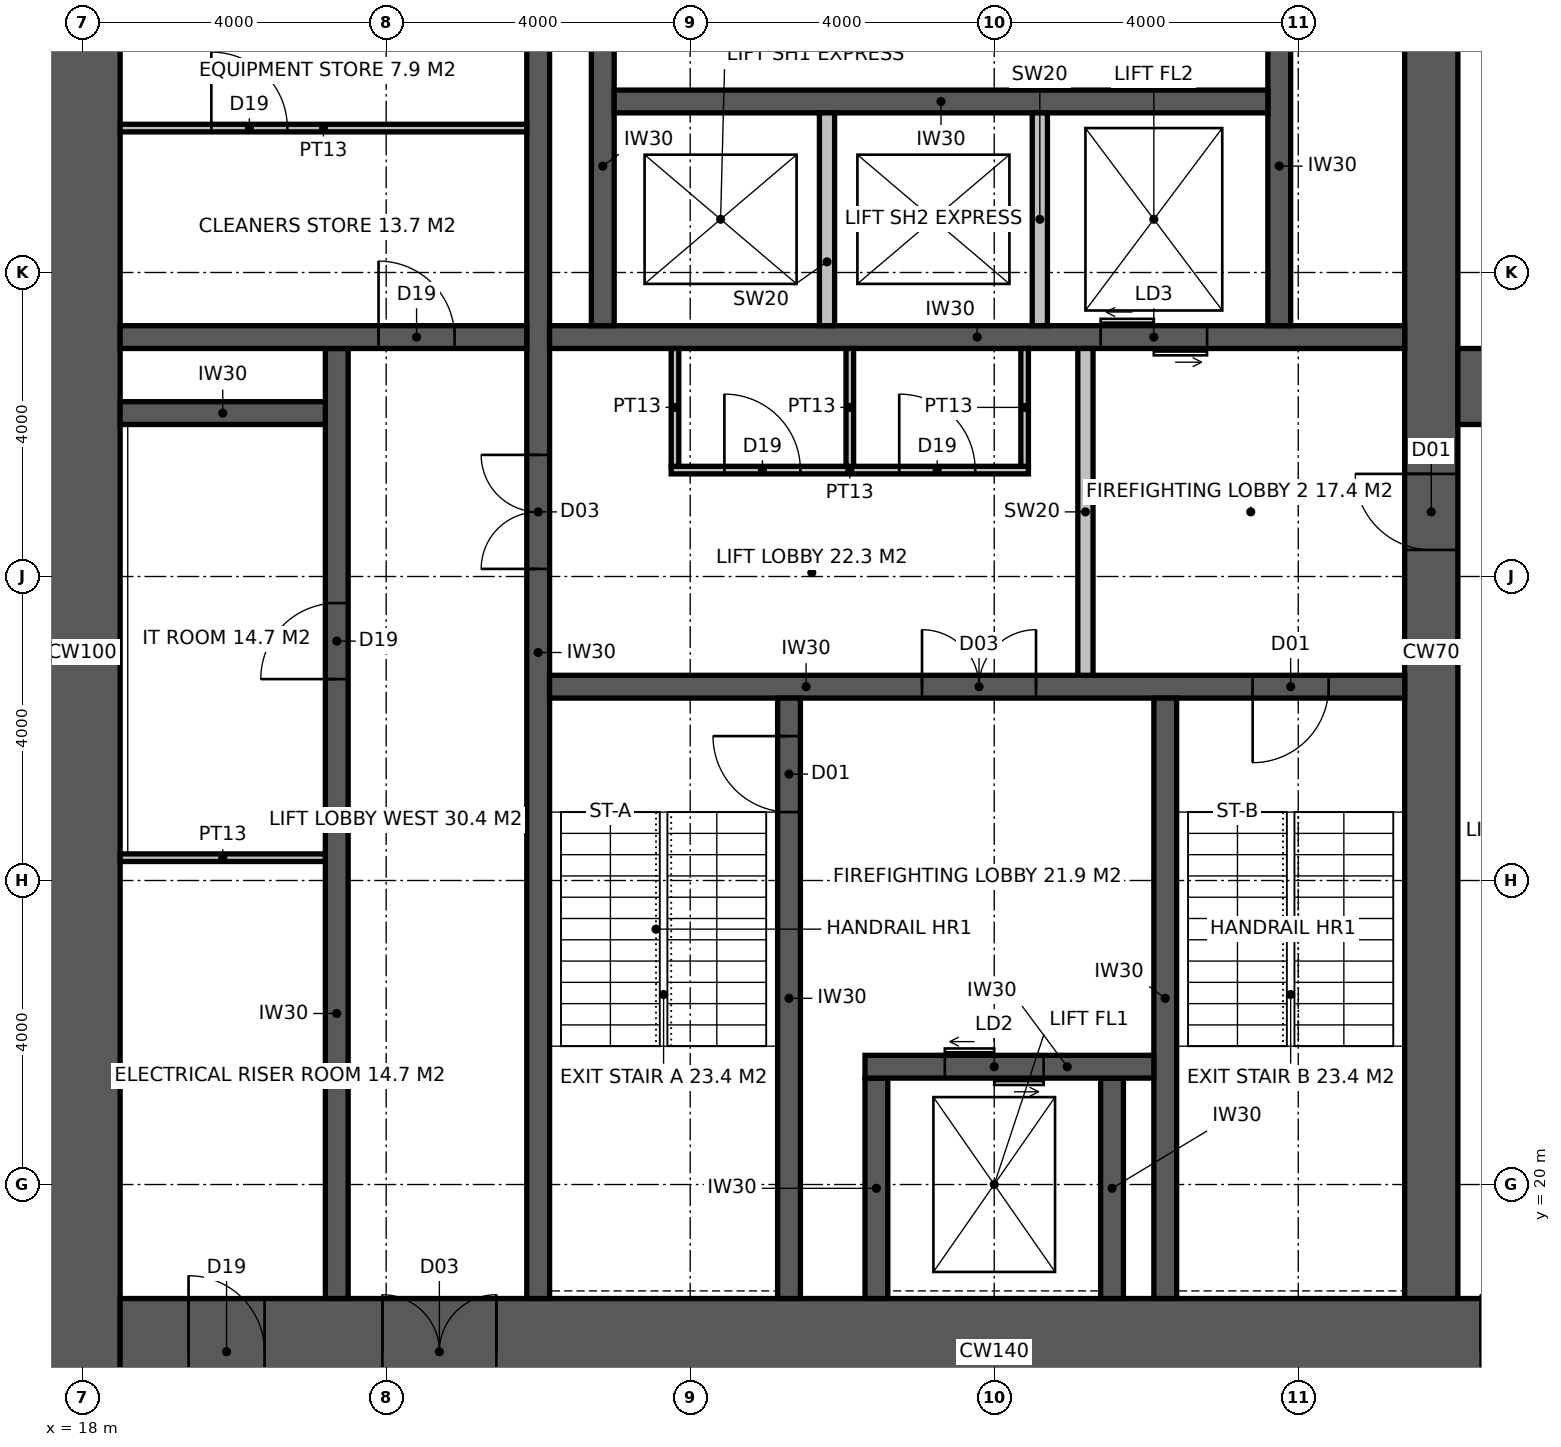
"""IFC4 building model, lengths in metres.
Left out: names, types, materials, properties, quantities, classifications, styles, units other than length and angle.
Written with IfcOpenShell. Run it as: python <this file> out.ifc"""

import sys

from ifc_helpers import new_model, si_unit, direction, frame, frame_2d, origin, place, context, subcontext, project, spatial, rectangle, extrude, element, fill, save


model = new_model("IFC4")
c1 = context("Model", 3, precision=1e-05, world=origin(), true_north=direction((0.0, 1.0)))
c2 = subcontext(c1, "Body", "Model", "MODEL_VIEW")
j1 = project(units=[si_unit("LENGTHUNIT", "METRE"), si_unit("PLANEANGLEUNIT", "RADIAN")], contexts=[c1])
p1 = place(None, origin())
s1 = spatial("IfcSite", under=j1, at=p1, CompositionType="ELEMENT")
p2 = place(p1, origin())
s2 = spatial("IfcBuilding", under=s1, at=p2, CompositionType="ELEMENT")
p3 = place(p2, frame((0.0, 0.0, 27.0)))
s3 = spatial("IfcBuildingStorey", under=s2, at=p3, CompositionType="ELEMENT", Elevation=27.0)
p4 = place(p3, frame((18.0, 17.1, -0.15), z_axis=(0.0, 0.0, 1.0), x_axis=(0.0, 1.0, 0.0)))
e1 = element("IfcWall", 1, at=p4, inside=s3, PredefinedType="SHEAR", context=c2, shape_type="SweptSolid", body=[
    extrude(rectangle(XDim=19.8, YDim=1.0, at=frame_2d((9.9, 0.0))), origin(), (0.0, 0.0, 1.0), 4.0),
])
p5 = place(p3, frame((18.5, 17.8, -0.15), z_axis=(0.0, 0.0, 1.0), x_axis=(1.0, 0.0, 0.0)))
e2 = element("IfcWall", 2, at=p5, inside=s3, PredefinedType="SHEAR", context=c2, shape_type="SweptSolid", body=[
    extrude(rectangle(XDim=23.0, YDim=1.4, at=frame_2d((11.5, 0.0))), origin(), (0.0, 0.0, 1.0), 4.0),
])
p6 = place(p5, frame((3.45, 0.0, 0.15)))
e3 = element("IfcOpeningElement", 3, at=p6, cuts=e2, PredefinedType="OPENING", context=c2, shape_type="SweptSolid", body=[
    extrude(rectangle(XDim=1.5, YDim=2.4, at=frame_2d((0.75, 1.2))), frame((0.0, 0.71, 0.0), z_axis=(0.0, -1.0, 0.0), x_axis=(1.0, 0.0, 0.0)), (0.0, 0.0, 1.0), 1.42),
])
p7 = place(p5, frame((17.9, 0.0, 0.15)))
e4 = element("IfcOpeningElement", 4, at=p7, cuts=e2, PredefinedType="OPENING", context=c2, shape_type="SweptSolid", body=[
    extrude(rectangle(XDim=1.5, YDim=2.4, at=frame_2d((0.75, 1.2))), frame((0.0, 0.71, 0.0), z_axis=(0.0, -1.0, 0.0), x_axis=(1.0, 0.0, 0.0)), (0.0, 0.0, 1.0), 1.42),
])
p8 = place(p5, frame((0.9, 0.0, 0.15)))
e5 = element("IfcOpeningElement", 5, at=p8, cuts=e2, PredefinedType="OPENING", context=c2, shape_type="SweptSolid", body=[
    extrude(rectangle(XDim=1.0, YDim=2.2, at=frame_2d((0.5, 1.1))), frame((0.0, 0.71, 0.0), z_axis=(0.0, -1.0, 0.0), x_axis=(1.0, 0.0, 0.0)), (0.0, 0.0, 1.0), 1.42),
])
p9 = place(p3, frame((35.75, 18.5, -0.15), z_axis=(0.0, 0.0, 1.0), x_axis=(0.0, 1.0, 0.0)))
e6 = element("IfcWall", 6, at=p9, inside=s3, PredefinedType="SHEAR", context=c2, shape_type="SweptSolid", body=[
    extrude(rectangle(XDim=17.0, YDim=0.7, at=frame_2d((8.5, 0.0))), origin(), (0.0, 0.0, 1.0), 4.0),
])
p10 = place(p9, frame((9.85, 0.0, 0.15)))
e7 = element("IfcOpeningElement", 7, at=p10, cuts=e6, PredefinedType="OPENING", context=c2, shape_type="SweptSolid", body=[
    extrude(rectangle(XDim=1.0, YDim=2.2, at=frame_2d((0.5, 1.1))), frame((0.0, 0.36, 0.0), z_axis=(0.0, -1.0, 0.0), x_axis=(1.0, 0.0, 0.0)), (0.0, 0.0, 1.0), 0.72),
])
p11 = place(p3, frame((24.0, 18.5, -0.15), z_axis=(0.0, 0.0, 1.0), x_axis=(0.0, 1.0, 0.0)))
e8 = element("IfcWall", 8, at=p11, inside=s3, PredefinedType="SHEAR", context=c2, shape_type="SweptSolid", body=[
    extrude(rectangle(XDim=17.0, YDim=0.3, at=frame_2d((8.5, 0.0))), origin(), (0.0, 0.0, 1.0), 4.0),
])
p12 = place(p11, frame((9.6, 0.0, 0.15)))
e9 = element("IfcOpeningElement", 9, at=p12, cuts=e8, PredefinedType="OPENING", context=c2, shape_type="SweptSolid", body=[
    extrude(rectangle(XDim=1.5, YDim=2.4, at=frame_2d((0.75, 1.2))), frame((0.0, 0.16, 0.0), z_axis=(0.0, -1.0, 0.0), x_axis=(1.0, 0.0, 0.0)), (0.0, 0.0, 1.0), 0.32),
])
p13 = place(p3, frame((24.15, 26.55, -0.15), z_axis=(0.0, 0.0, 1.0), x_axis=(1.0, 0.0, 0.0)))
e10 = element("IfcWall", 10, at=p13, inside=s3, PredefinedType="SHEAR", context=c2, shape_type="SweptSolid", body=[
    extrude(rectangle(XDim=11.25, YDim=0.3, at=frame_2d((5.625, 0.0))), origin(), (0.0, 0.0, 1.0), 4.0),
])
p14 = place(p13, frame((9.25, 0.0, 0.15)))
e11 = element("IfcOpeningElement", 11, at=p14, cuts=e10, PredefinedType="OPENING", context=c2, shape_type="SweptSolid", body=[
    extrude(rectangle(XDim=1.0, YDim=2.2, at=frame_2d((0.5, 1.1))), frame((0.0, 0.16, 0.0), z_axis=(0.0, -1.0, 0.0), x_axis=(1.0, 0.0, 0.0)), (0.0, 0.0, 1.0), 0.32),
])
p15 = place(p13, frame((4.9, 0.0, 0.15)))
e12 = element("IfcOpeningElement", 12, at=p15, cuts=e10, PredefinedType="OPENING", context=c2, shape_type="SweptSolid", body=[
    extrude(rectangle(XDim=1.5, YDim=2.4, at=frame_2d((0.75, 1.2))), frame((0.0, 0.16, 0.0), z_axis=(0.0, -1.0, 0.0), x_axis=(1.0, 0.0, 0.0)), (0.0, 0.0, 1.0), 0.32),
])
p16 = place(p3, frame((27.3, 18.5, -0.15), z_axis=(0.0, 0.0, 1.0), x_axis=(0.0, 1.0, 0.0)))
e13 = element("IfcWall", 13, at=p16, inside=s3, PredefinedType="SHEAR", context=c2, shape_type="SweptSolid", body=[
    extrude(rectangle(XDim=7.9, YDim=0.3, at=frame_2d((3.95, 0.0))), origin(), (0.0, 0.0, 1.0), 4.0),
])
p17 = place(p16, frame((6.4, 0.0, 0.15)))
e14 = element("IfcOpeningElement", 14, at=p17, cuts=e13, PredefinedType="OPENING", context=c2, shape_type="SweptSolid", body=[
    extrude(rectangle(XDim=1.0, YDim=2.2, at=frame_2d((0.5, 1.1))), frame((0.0, 0.16, 0.0), z_axis=(0.0, -1.0, 0.0), x_axis=(1.0, 0.0, 0.0)), (0.0, 0.0, 1.0), 0.32),
])
p18 = place(p3, frame((32.25, 18.5, -0.15), z_axis=(0.0, 0.0, 1.0), x_axis=(0.0, 1.0, 0.0)))
e15 = element("IfcWall", 15, at=p18, inside=s3, PredefinedType="SHEAR", context=c2, shape_type="SweptSolid", body=[
    extrude(rectangle(XDim=7.9, YDim=0.3, at=frame_2d((3.95, 0.0))), origin(), (0.0, 0.0, 1.0), 4.0),
])
for number, where, z_axis, x_axis in (
    (16, (28.45, 18.5, -0.15), (0.0, 0.0, 1.0), (0.0, 1.0, 0.0)),
    (17, (31.55, 18.5, -0.15), (0.0, 0.0, 1.0), (0.0, 1.0, 0.0)),
):
    element("IfcWall", number, at=place(p3, frame(where, z_axis=z_axis, x_axis=x_axis)), inside=s3, PredefinedType="SHEAR", context=c2, shape_type="SweptSolid", body=[
        extrude(rectangle(XDim=2.9, YDim=0.3, at=frame_2d((1.45, 0.0))), origin(), (0.0, 0.0, 1.0), 4.0),
    ])
p19 = place(p3, frame((28.3, 21.55, -0.15), z_axis=(0.0, 0.0, 1.0), x_axis=(1.0, 0.0, 0.0)))
e18 = element("IfcWall", 18, at=p19, inside=s3, PredefinedType="SHEAR", context=c2, shape_type="SweptSolid", body=[
    extrude(rectangle(XDim=3.8, YDim=0.3, at=frame_2d((1.9, 0.0))), origin(), (0.0, 0.0, 1.0), 4.0),
])
p20 = place(p19, frame((1.05, 0.0, 0.15)))
e19 = element("IfcOpeningElement", 19, at=p20, cuts=e18, PredefinedType="OPENING", context=c2, shape_type="SweptSolid", body=[
    extrude(rectangle(XDim=1.3, YDim=2.4, at=frame_2d((0.65, 1.2))), frame((0.0, 0.16, 0.0), z_axis=(0.0, -1.0, 0.0), x_axis=(1.0, 0.0, 0.0)), (0.0, 0.0, 1.0), 0.32),
])
p21 = place(p3, frame((24.15, 31.15, -0.15), z_axis=(0.0, 0.0, 1.0), x_axis=(1.0, 0.0, 0.0)))
e20 = element("IfcWall", 20, at=p21, inside=s3, PredefinedType="SHEAR", context=c2, shape_type="SweptSolid", body=[
    extrude(rectangle(XDim=11.25, YDim=0.3, at=frame_2d((5.625, 0.0))), origin(), (0.0, 0.0, 1.0), 4.0),
])
p22 = place(p21, frame((7.25, 0.0, 0.15)))
e21 = element("IfcOpeningElement", 21, at=p22, cuts=e20, PredefinedType="OPENING", context=c2, shape_type="SweptSolid", body=[
    extrude(rectangle(XDim=1.4, YDim=2.4, at=frame_2d((0.7, 1.2))), frame((0.0, 0.16, 0.0), z_axis=(0.0, -1.0, 0.0), x_axis=(1.0, 0.0, 0.0)), (0.0, 0.0, 1.0), 0.32),
])
p23 = place(p3, frame((21.35, 18.5, -0.15), z_axis=(0.0, 0.0, 1.0), x_axis=(0.0, 1.0, 0.0)))
e22 = element("IfcWall", 22, at=p23, inside=s3, PredefinedType="SHEAR", context=c2, shape_type="SweptSolid", body=[
    extrude(rectangle(XDim=12.5, YDim=0.3, at=frame_2d((6.25, 0.0))), origin(), (0.0, 0.0, 1.0), 4.0),
])
p24 = place(p23, frame((8.15, 0.0, 0.15)))
e23 = element("IfcOpeningElement", 23, at=p24, cuts=e22, PredefinedType="OPENING", context=c2, shape_type="SweptSolid", body=[
    extrude(rectangle(XDim=1.0, YDim=2.2, at=frame_2d((0.5, 1.1))), frame((0.0, 0.16, 0.0), z_axis=(0.0, -1.0, 0.0), x_axis=(1.0, 0.0, 0.0)), (0.0, 0.0, 1.0), 0.32),
])
p25 = place(p3, frame((18.5, 31.15, -0.15), z_axis=(0.0, 0.0, 1.0), x_axis=(1.0, 0.0, 0.0)))
e24 = element("IfcWall", 24, at=p25, inside=s3, PredefinedType="SHEAR", context=c2, shape_type="SweptSolid", body=[
    extrude(rectangle(XDim=5.35, YDim=0.3, at=frame_2d((2.675, 0.0))), origin(), (0.0, 0.0, 1.0), 4.0),
])
p26 = place(p25, frame((3.4, 0.0, 0.15)))
e25 = element("IfcOpeningElement", 25, at=p26, cuts=e24, PredefinedType="OPENING", context=c2, shape_type="SweptSolid", body=[
    extrude(rectangle(XDim=1.0, YDim=2.2, at=frame_2d((0.5, 1.1))), frame((0.0, 0.16, 0.0), z_axis=(0.0, -1.0, 0.0), x_axis=(1.0, 0.0, 0.0)), (0.0, 0.0, 1.0), 0.32),
])
p27 = place(p3, frame((18.5, 30.15, -0.15), z_axis=(0.0, 0.0, 1.0), x_axis=(1.0, 0.0, 0.0)))
e26 = element("IfcWall", 26, at=p27, inside=s3, PredefinedType="SHEAR", context=c2, shape_type="SweptSolid", body=[
    extrude(rectangle(XDim=2.7, YDim=0.3, at=frame_2d((1.35, 0.0))), origin(), (0.0, 0.0, 1.0), 4.0),
])
for number, where, z_axis, x_axis in (
    (27, (24.85, 31.3, -0.15), (0.0, 0.0, 1.0), (0.0, 1.0, 0.0)),
    (28, (33.75, 31.3, -0.15), (0.0, 0.0, 1.0), (0.0, 1.0, 0.0)),
):
    element("IfcWall", number, at=place(p3, frame(where, z_axis=z_axis, x_axis=x_axis)), inside=s3, PredefinedType="SHEAR", context=c2, shape_type="SweptSolid", body=[
        extrude(rectangle(XDim=4.2, YDim=0.3, at=frame_2d((2.1, 0.0))), origin(), (0.0, 0.0, 1.0), 4.0),
    ])
p28 = place(p3, frame((25.0, 34.25, -0.15), z_axis=(0.0, 0.0, 1.0), x_axis=(1.0, 0.0, 0.0)))
e29 = element("IfcWall", 29, at=p28, inside=s3, PredefinedType="SHEAR", context=c2, shape_type="SweptSolid", body=[
    extrude(rectangle(XDim=8.6, YDim=0.3, at=frame_2d((4.3, 0.0))), origin(), (0.0, 0.0, 1.0), 4.0),
])
for number, where, z_axis, x_axis in (
    (30, (27.8, 31.3, -0.15), (0.0, 0.0, 1.0), (0.0, 1.0, 0.0)),
    (31, (30.6, 31.3, -0.15), (0.0, 0.0, 1.0), (0.0, 1.0, 0.0)),
):
    element("IfcWall", number, at=place(p3, frame(where, z_axis=z_axis, x_axis=x_axis)), inside=s3, PredefinedType="SOLIDWALL", context=c2, shape_type="SweptSolid", body=[
        extrude(rectangle(XDim=2.8, YDim=0.2, at=frame_2d((1.4, 0.0))), origin(), (0.0, 0.0, 1.0), 4.0),
    ])
p29 = place(p3, frame((36.1, 30.5, -0.15), z_axis=(0.0, 0.0, 1.0), x_axis=(1.0, 0.0, 0.0)))
e32 = element("IfcWall", 32, at=p29, inside=s3, PredefinedType="SHEAR", context=c2, shape_type="SweptSolid", body=[
    extrude(rectangle(XDim=5.4, YDim=1.0, at=frame_2d((2.7, 0.0))), origin(), (0.0, 0.0, 1.0), 4.0),
])
p30 = place(p29, frame((0.6, 0.0, 0.15)))
e33 = element("IfcOpeningElement", 33, at=p30, cuts=e32, PredefinedType="OPENING", context=c2, shape_type="SweptSolid", body=[
    extrude(rectangle(XDim=1.0, YDim=2.2, at=frame_2d((0.5, 1.1))), frame((0.0, 0.51, 0.0), z_axis=(0.0, -1.0, 0.0), x_axis=(1.0, 0.0, 0.0)), (0.0, 0.0, 1.0), 1.02),
])
p31 = place(p3, frame((31.2, 26.7, 0.0), z_axis=(0.0, 0.0, 1.0), x_axis=(0.0, 1.0, 0.0)))
e34 = element("IfcWall", 34, at=p31, inside=s3, PredefinedType="SOLIDWALL", context=c2, shape_type="SweptSolid", body=[
    extrude(rectangle(XDim=4.3, YDim=0.2, at=frame_2d((2.15, 0.0))), origin(), (0.0, 0.0, 1.0), 3.85),
])
p32 = place(p3, frame((18.5, 33.9, 0.0), z_axis=(0.0, 0.0, 1.0), x_axis=(1.0, 0.0, 0.0)))
e35 = element("IfcWall", 35, at=p32, inside=s3, PredefinedType="PARTITIONING", context=c2, shape_type="SweptSolid", body=[
    extrude(rectangle(XDim=5.35, YDim=0.1, at=frame_2d((2.675, 0.0))), origin(), (0.0, 0.0, 1.0), 3.85),
])
p33 = place(p32, frame((1.2, 0.0, 0.0)))
e36 = element("IfcOpeningElement", 36, at=p33, cuts=e35, PredefinedType="OPENING", context=c2, shape_type="SweptSolid", body=[
    extrude(rectangle(XDim=1.0, YDim=2.2, at=frame_2d((0.5, 1.1))), frame((0.0, 0.06, 0.0), z_axis=(0.0, -1.0, 0.0), x_axis=(1.0, 0.0, 0.0)), (0.0, 0.0, 1.0), 0.12),
])
p34 = place(p3, frame((25.75, 29.4, 0.0), z_axis=(0.0, 0.0, 1.0), x_axis=(1.0, 0.0, 0.0)))
e37 = element("IfcWall", 37, at=p34, inside=s3, PredefinedType="PARTITIONING", context=c2, shape_type="SweptSolid", body=[
    extrude(rectangle(XDim=4.7, YDim=0.1, at=frame_2d((2.35, 0.0))), origin(), (0.0, 0.0, 1.0), 3.85),
])
p35 = place(p34, frame((0.7, 0.0, 0.0)))
e38 = element("IfcOpeningElement", 38, at=p35, cuts=e37, PredefinedType="OPENING", context=c2, shape_type="SweptSolid", body=[
    extrude(rectangle(XDim=1.0, YDim=2.2, at=frame_2d((0.5, 1.1))), frame((0.0, 0.06, 0.0), z_axis=(0.0, -1.0, 0.0), x_axis=(1.0, 0.0, 0.0)), (0.0, 0.0, 1.0), 0.12),
])
p36 = place(p34, frame((3.0, 0.0, 0.0)))
e39 = element("IfcOpeningElement", 39, at=p36, cuts=e37, PredefinedType="OPENING", context=c2, shape_type="SweptSolid", body=[
    extrude(rectangle(XDim=1.0, YDim=2.2, at=frame_2d((0.5, 1.1))), frame((0.0, 0.06, 0.0), z_axis=(0.0, -1.0, 0.0), x_axis=(1.0, 0.0, 0.0)), (0.0, 0.0, 1.0), 0.12),
])
for number, where, z_axis, x_axis in (
    (40, (25.8, 29.45, 0.0), (0.0, 0.0, 1.0), (0.0, 1.0, 0.0)),
    (41, (30.4, 29.45, 0.0), (0.0, 0.0, 1.0), (0.0, 1.0, 0.0)),
    (42, (28.1, 29.45, 0.0), (0.0, 0.0, 1.0), (0.0, 1.0, 0.0)),
):
    element("IfcWall", number, at=place(p3, frame(where, z_axis=z_axis, x_axis=x_axis)), inside=s3, PredefinedType="PARTITIONING", context=c2, shape_type="SweptSolid", body=[
        extrude(rectangle(XDim=1.55, YDim=0.1, at=frame_2d((0.775, 0.0))), origin(), (0.0, 0.0, 1.0), 3.85),
    ])
p37 = place(p3, frame((18.5, 24.3, 0.0), z_axis=(0.0, 0.0, 1.0), x_axis=(1.0, 0.0, 0.0)))
e43 = element("IfcWall", 43, at=p37, inside=s3, PredefinedType="PARTITIONING", context=c2, shape_type="SweptSolid", body=[
    extrude(rectangle(XDim=2.7, YDim=0.1, at=frame_2d((1.35, 0.0))), origin(), (0.0, 0.0, 1.0), 3.85),
])
p38 = place(p17, origin())
e44 = element("IfcDoor", 44, at=p38, inside=s3, OperationType="SINGLE_SWING_RIGHT", PredefinedType="DOOR", context=c2, shape_type="SweptSolid", body=[
    extrude(rectangle(XDim=1.0, YDim=2.2, at=frame_2d((0.5, 1.1))), frame((0.0, 0.025, 0.0), z_axis=(0.0, -1.0, 0.0), x_axis=(1.0, 0.0, 0.0)), (0.0, 0.0, 1.0), 0.05),
])
fill(e14, e44)
p39 = place(p14, frame((1.0, 0.0, 0.0), z_axis=(0.0, 0.0, 1.0), x_axis=(-1.0, 0.0, 0.0)))
e45 = element("IfcDoor", 45, at=p39, inside=s3, OperationType="SINGLE_SWING_RIGHT", PredefinedType="DOOR", context=c2, shape_type="SweptSolid", body=[
    extrude(rectangle(XDim=1.0, YDim=2.2, at=frame_2d((0.5, 1.1))), frame((0.0, 0.025, 0.0), z_axis=(0.0, -1.0, 0.0), x_axis=(1.0, 0.0, 0.0)), (0.0, 0.0, 1.0), 0.05),
])
fill(e11, e45)
p40 = place(p10, origin())
e46 = element("IfcDoor", 46, at=p40, inside=s3, OperationType="SINGLE_SWING_RIGHT", PredefinedType="DOOR", context=c2, shape_type="SweptSolid", body=[
    extrude(rectangle(XDim=1.0, YDim=2.2, at=frame_2d((0.5, 1.1))), frame((0.0, 0.025, 0.0), z_axis=(0.0, -1.0, 0.0), x_axis=(1.0, 0.0, 0.0)), (0.0, 0.0, 1.0), 0.05),
])
fill(e7, e46)
p41 = place(p15, origin())
e47 = element("IfcDoor", 47, at=p41, inside=s3, OperationType="DOUBLE_DOOR_DOUBLE_SWING", PredefinedType="DOOR", context=c2, shape_type="SweptSolid", body=[
    extrude(rectangle(XDim=1.5, YDim=2.4, at=frame_2d((0.75, 1.2))), frame((0.0, 0.025, 0.0), z_axis=(0.0, -1.0, 0.0), x_axis=(1.0, 0.0, 0.0)), (0.0, 0.0, 1.0), 0.05),
])
fill(e12, e47)
p42 = place(p12, origin())
e48 = element("IfcDoor", 48, at=p42, inside=s3, OperationType="DOUBLE_DOOR_DOUBLE_SWING", PredefinedType="DOOR", context=c2, shape_type="SweptSolid", body=[
    extrude(rectangle(XDim=1.5, YDim=2.4, at=frame_2d((0.75, 1.2))), frame((0.0, 0.025, 0.0), z_axis=(0.0, -1.0, 0.0), x_axis=(1.0, 0.0, 0.0)), (0.0, 0.0, 1.0), 0.05),
])
fill(e9, e48)
p43 = place(p26, origin())
e49 = element("IfcDoor", 49, at=p43, inside=s3, OperationType="SINGLE_SWING_LEFT", PredefinedType="DOOR", context=c2, shape_type="SweptSolid", body=[
    extrude(rectangle(XDim=1.0, YDim=2.2, at=frame_2d((0.5, 1.1))), frame((0.0, 0.025, 0.0), z_axis=(0.0, -1.0, 0.0), x_axis=(1.0, 0.0, 0.0)), (0.0, 0.0, 1.0), 0.05),
])
fill(e25, e49)
p44 = place(p33, origin())
e50 = element("IfcDoor", 50, at=p44, inside=s3, OperationType="SINGLE_SWING_LEFT", PredefinedType="DOOR", context=c2, shape_type="SweptSolid", body=[
    extrude(rectangle(XDim=1.0, YDim=2.2, at=frame_2d((0.5, 1.1))), frame((0.0, 0.025, 0.0), z_axis=(0.0, -1.0, 0.0), x_axis=(1.0, 0.0, 0.0)), (0.0, 0.0, 1.0), 0.05),
])
fill(e36, e50)
p45 = place(p35, origin())
e51 = element("IfcDoor", 51, at=p45, inside=s3, OperationType="SINGLE_SWING_LEFT", PredefinedType="DOOR", context=c2, shape_type="SweptSolid", body=[
    extrude(rectangle(XDim=1.0, YDim=2.2, at=frame_2d((0.5, 1.1))), frame((0.0, 0.025, 0.0), z_axis=(0.0, -1.0, 0.0), x_axis=(1.0, 0.0, 0.0)), (0.0, 0.0, 1.0), 0.05),
])
fill(e38, e51)
p46 = place(p36, origin())
e52 = element("IfcDoor", 52, at=p46, inside=s3, OperationType="SINGLE_SWING_LEFT", PredefinedType="DOOR", context=c2, shape_type="SweptSolid", body=[
    extrude(rectangle(XDim=1.0, YDim=2.2, at=frame_2d((0.5, 1.1))), frame((0.0, 0.025, 0.0), z_axis=(0.0, -1.0, 0.0), x_axis=(1.0, 0.0, 0.0)), (0.0, 0.0, 1.0), 0.05),
])
fill(e39, e52)
p47 = place(p24, origin())
e53 = element("IfcDoor", 53, at=p47, inside=s3, OperationType="SINGLE_SWING_LEFT", PredefinedType="DOOR", context=c2, shape_type="SweptSolid", body=[
    extrude(rectangle(XDim=1.0, YDim=2.2, at=frame_2d((0.5, 1.1))), frame((0.0, 0.025, 0.0), z_axis=(0.0, -1.0, 0.0), x_axis=(1.0, 0.0, 0.0)), (0.0, 0.0, 1.0), 0.05),
])
fill(e23, e53)
p48 = place(p6, origin())
e54 = element("IfcDoor", 54, at=p48, inside=s3, OperationType="DOUBLE_DOOR_DOUBLE_SWING", PredefinedType="DOOR", context=c2, shape_type="SweptSolid", body=[
    extrude(rectangle(XDim=1.5, YDim=2.4, at=frame_2d((0.75, 1.2))), frame((0.0, 0.025, 0.0), z_axis=(0.0, -1.0, 0.0), x_axis=(1.0, 0.0, 0.0)), (0.0, 0.0, 1.0), 0.05),
])
fill(e3, e54)
p49 = place(p8, origin())
e55 = element("IfcDoor", 55, at=p49, inside=s3, OperationType="SINGLE_SWING_LEFT", PredefinedType="DOOR", context=c2, shape_type="SweptSolid", body=[
    extrude(rectangle(XDim=1.0, YDim=2.2, at=frame_2d((0.5, 1.1))), frame((0.0, 0.025, 0.0), z_axis=(0.0, -1.0, 0.0), x_axis=(1.0, 0.0, 0.0)), (0.0, 0.0, 1.0), 0.05),
])
fill(e5, e55)
p50 = place(p20, origin())
e56 = element("IfcDoor", 56, at=p50, inside=s3, OperationType="DOUBLE_DOOR_SLIDING", PredefinedType="DOOR", context=c2, shape_type="SweptSolid", body=[
    extrude(rectangle(XDim=1.3, YDim=2.4, at=frame_2d((0.65, 1.2))), frame((0.0, 0.025, 0.0), z_axis=(0.0, -1.0, 0.0), x_axis=(1.0, 0.0, 0.0)), (0.0, 0.0, 1.0), 0.05),
])
fill(e19, e56)
p51 = place(p22, origin())
e57 = element("IfcDoor", 57, at=p51, inside=s3, OperationType="DOUBLE_DOOR_SLIDING", PredefinedType="DOOR", context=c2, shape_type="SweptSolid", body=[
    extrude(rectangle(XDim=1.4, YDim=2.4, at=frame_2d((0.7, 1.2))), frame((0.0, 0.025, 0.0), z_axis=(0.0, -1.0, 0.0), x_axis=(1.0, 0.0, 0.0)), (0.0, 0.0, 1.0), 0.05),
])
fill(e21, e57)
save(model, sys.argv[1])
